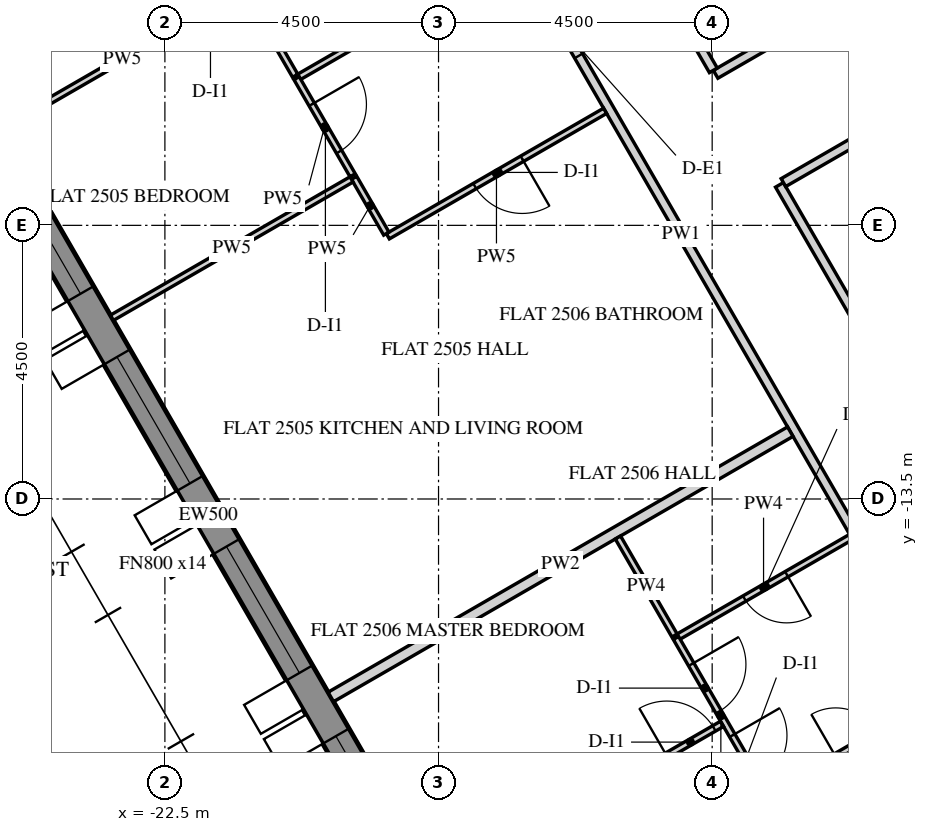
"""IFC4 building model, lengths in metres.
Left out: names, types, materials, properties, quantities, classifications, styles, units other than length and angle.
Written with IfcOpenShell. Run it as: python <this file> out.ifc"""

import sys

from ifc_helpers import new_model, si_unit, direction, frame, frame_2d, origin, place, context, subcontext, project, spatial, polyline, rectangle, outline, extrude, element, fill, save


model = new_model("IFC4")
c1 = context("Model", 3, precision=1e-05, world=origin(), true_north=direction((0.0, 1.0)))
c2 = subcontext(c1, "Body", "Model", "MODEL_VIEW")
j1 = project(units=[si_unit("LENGTHUNIT", "METRE"), si_unit("PLANEANGLEUNIT", "RADIAN")], contexts=[c1])
p1 = place(None, origin())
s1 = spatial("IfcSite", under=j1, at=p1, CompositionType="ELEMENT")
p2 = place(p1, origin())
s2 = spatial("IfcBuilding", under=s1, at=p2, CompositionType="ELEMENT")
p3 = place(p2, frame((0.0, 0.0, 314.7)))
s3 = spatial("IfcBuildingStorey", under=s2, at=p3, CompositionType="ELEMENT", Elevation=314.7)
p4 = place(p3, frame((-28.149, -2.745, -0.15), z_axis=(0.0, 0.0, 1.0), x_axis=(0.500003737743, -0.866023245787, 0.0)))
e1 = element("IfcWall", 1, at=p4, inside=s3, PredefinedType="SOLIDWALL", context=c2, shape_type="SweptSolid", body=[
    extrude(outline(polyline([(-0.021, -0.25), (25.468, -0.25), (25.421, 0.25), (0.021, 0.25), (-0.021, -0.25)])), origin(), (0.0, 0.0, 1.0), 3.9),
])
p5 = place(p4, frame((2.522, 0.0, 0.75)))
e2 = element("IfcOpeningElement", 2, at=p5, cuts=e1, PredefinedType="OPENING", context=c2, shape_type="SweptSolid", body=[
    extrude(rectangle(XDim=2.4, YDim=2.7, at=frame_2d((1.2, 1.35))), frame((0.0, 0.26, 0.0), z_axis=(0.0, -1.0, 0.0), x_axis=(1.0, 0.0, 0.0)), (0.0, 0.0, 1.0), 0.52),
])
p6 = place(p4, frame((6.122, 0.0, 0.75)))
e3 = element("IfcOpeningElement", 3, at=p6, cuts=e1, PredefinedType="OPENING", context=c2, shape_type="SweptSolid", body=[
    extrude(rectangle(XDim=2.4, YDim=2.7, at=frame_2d((1.2, 1.35))), frame((0.0, 0.26, 0.0), z_axis=(0.0, -1.0, 0.0), x_axis=(1.0, 0.0, 0.0)), (0.0, 0.0, 1.0), 0.52),
])
p7 = place(p4, frame((9.722, 0.0, 0.75)))
e4 = element("IfcOpeningElement", 4, at=p7, cuts=e1, PredefinedType="OPENING", context=c2, shape_type="SweptSolid", body=[
    extrude(rectangle(XDim=2.4, YDim=2.7, at=frame_2d((1.2, 1.35))), frame((0.0, 0.26, 0.0), z_axis=(0.0, -1.0, 0.0), x_axis=(1.0, 0.0, 0.0)), (0.0, 0.0, 1.0), 0.52),
])
p8 = place(p4, frame((13.323, 0.0, 0.75)))
e5 = element("IfcOpeningElement", 5, at=p8, cuts=e1, PredefinedType="OPENING", context=c2, shape_type="SweptSolid", body=[
    extrude(rectangle(XDim=2.4, YDim=2.7, at=frame_2d((1.2, 1.35))), frame((0.0, 0.26, 0.0), z_axis=(0.0, -1.0, 0.0), x_axis=(1.0, 0.0, 0.0)), (0.0, 0.0, 1.0), 0.52),
])
p9 = place(p4, frame((16.922, 0.0, 0.75)))
e6 = element("IfcOpeningElement", 6, at=p9, cuts=e1, PredefinedType="OPENING", context=c2, shape_type="SweptSolid", body=[
    extrude(rectangle(XDim=2.4, YDim=2.7, at=frame_2d((1.2, 1.35))), frame((0.0, 0.26, 0.0), z_axis=(0.0, -1.0, 0.0), x_axis=(1.0, 0.0, 0.0)), (0.0, 0.0, 1.0), 0.52),
])
p10 = place(p4, frame((20.522, 0.0, 0.75)))
e7 = element("IfcOpeningElement", 7, at=p10, cuts=e1, PredefinedType="OPENING", context=c2, shape_type="SweptSolid", body=[
    extrude(rectangle(XDim=2.4, YDim=2.7, at=frame_2d((1.2, 1.35))), frame((0.0, 0.26, 0.0), z_axis=(0.0, -1.0, 0.0), x_axis=(1.0, 0.0, 0.0)), (0.0, 0.0, 1.0), 0.52),
])
p11 = place(p3, frame((-12.471, 0.0, -0.15), z_axis=(0.0, 0.0, 1.0), x_axis=(0.499996419489, -0.866027470984, 0.0)))
e8 = element("IfcWall", 8, at=p11, inside=s3, PredefinedType="SHEAR", context=c2, shape_type="SweptSolid", body=[
    extrude(outline(polyline([(-0.115, -0.2), (12.586, -0.2), (12.355, 0.2), (0.115, 0.2), (-0.115, -0.2)])), origin(), (0.0, 0.0, 1.0), 3.9),
])
p12 = place(p11, frame((5.306, 0.0, 0.15)))
e9 = element("IfcOpeningElement", 9, at=p12, cuts=e8, PredefinedType="OPENING", context=c2, shape_type="SweptSolid", body=[
    extrude(rectangle(XDim=1.8, YDim=2.4, at=frame_2d((0.9, 1.2))), frame((0.0, 0.21, 0.0), z_axis=(0.0, -1.0, 0.0), x_axis=(1.0, 0.0, 0.0)), (0.0, 0.0, 1.0), 0.42),
])
p13 = place(p3, frame((-17.659, -2.814, 0.0), z_axis=(0.0, 0.0, 1.0), x_axis=(0.499992611149, -0.866029669697, 0.0)))
e10 = element("IfcWall", 10, at=p13, inside=s3, PredefinedType="PARTITIONING", context=c2, shape_type="SweptSolid", body=[
    extrude(rectangle(XDim=14.602, YDim=0.15, at=frame_2d((7.301, 0.0))), origin(), (0.0, 0.0, 1.0), 2.988),
])
p14 = place(p13, frame((2.925, 0.0, 0.0)))
e11 = element("IfcOpeningElement", 11, at=p14, cuts=e10, PredefinedType="OPENING", context=c2, shape_type="SweptSolid", body=[
    extrude(rectangle(XDim=1.0, YDim=2.1, at=frame_2d((0.5, 1.05))), frame((0.0, 0.085, 0.0), z_axis=(0.0, -1.0, 0.0), x_axis=(1.0, 0.0, 0.0)), (0.0, 0.0, 1.0), 0.17),
])
p15 = place(p13, frame((13.452, 0.0, 0.0)))
e12 = element("IfcOpeningElement", 12, at=p15, cuts=e10, PredefinedType="OPENING", context=c2, shape_type="SweptSolid", body=[
    extrude(rectangle(XDim=1.0, YDim=2.1, at=frame_2d((0.5, 1.05))), frame((0.0, 0.085, 0.0), z_axis=(0.0, -1.0, 0.0), x_axis=(1.0, 0.0, 0.0)), (0.0, 0.0, 1.0), 0.17),
])
p16 = place(p3, frame((-10.066, -4.566, 0.0), z_axis=(0.0, 0.0, 1.0), x_axis=(-0.866027128446, -0.499997012787, 0.0)))
e13 = element("IfcWall", 13, at=p16, inside=s3, PredefinedType="PARTITIONING", context=c2, shape_type="SweptSolid", body=[
    extrude(rectangle(XDim=3.9, YDim=0.15, at=frame_2d((1.95, 0.0))), origin(), (0.0, 0.0, 1.0), 2.988),
])
p17 = place(p3, frame((-13.481, -6.451, 0.0), z_axis=(0.0, 0.0, 1.0), x_axis=(-0.499990905326, 0.866030654533, 0.0)))
e14 = element("IfcWall", 14, at=p17, inside=s3, PredefinedType="PARTITIONING", context=c2, shape_type="SweptSolid", body=[
    extrude(rectangle(XDim=4.356, YDim=0.15, at=frame_2d((2.178, 0.0))), origin(), (0.0, 0.0, 1.0), 2.988),
])
p18 = place(p17, frame((1.728, 0.0, 0.0)))
e15 = element("IfcOpeningElement", 15, at=p18, cuts=e14, PredefinedType="OPENING", context=c2, shape_type="SweptSolid", body=[
    extrude(rectangle(XDim=0.9, YDim=2.1, at=frame_2d((0.45, 1.05))), frame((0.0, 0.085, 0.0), z_axis=(0.0, -1.0, 0.0), x_axis=(1.0, 0.0, 0.0)), (0.0, 0.0, 1.0), 0.17),
])
p19 = place(p3, frame((-9.403, -13.514, 0.0), z_axis=(0.0, 0.0, 1.0), x_axis=(-0.499998061752, 0.866026522829, 0.0)))
e16 = element("IfcWall", 16, at=p19, inside=s3, PredefinedType="PARTITIONING", context=c2, shape_type="SweptSolid", body=[
    extrude(rectangle(XDim=5.981, YDim=0.15, at=frame_2d((2.99, 0.0))), origin(), (0.0, 0.0, 1.0), 2.988),
])
p20 = place(p3, frame((-12.328, -8.297, 0.0), z_axis=(0.0, 0.0, 1.0), x_axis=(0.866027222339, 0.499996850159, 0.0)))
e17 = element("IfcWall", 17, at=p20, inside=s3, PredefinedType="PARTITIONING", context=c2, shape_type="SweptSolid", body=[
    extrude(rectangle(XDim=3.825, YDim=0.15, at=frame_2d((1.913, 0.0))), origin(), (0.0, 0.0, 1.0), 2.988),
])
p21 = place(p3, frame((-15.261, -7.117, 0.0), z_axis=(0.0, 0.0, 1.0), x_axis=(-0.866019999656, -0.500009360108, 0.0)))
e18 = element("IfcWall", 18, at=p21, inside=s3, PredefinedType="PARTITIONING", context=c2, shape_type="SweptSolid", body=[
    extrude(rectangle(XDim=4.125, YDim=0.1, at=frame_2d((2.062, 0.0))), origin(), (0.0, 0.0, 1.0), 2.988),
])
p22 = place(p21, frame((1.575, 0.0, 0.0)))
e19 = element("IfcOpeningElement", 19, at=p22, cuts=e18, PredefinedType="OPENING", context=c2, shape_type="SweptSolid", body=[
    extrude(rectangle(XDim=0.9, YDim=2.1, at=frame_2d((0.45, 1.05))), frame((0.0, 0.06, 0.0), z_axis=(0.0, -1.0, 0.0), x_axis=(1.0, 0.0, 0.0)), (0.0, 0.0, 1.0), 0.12),
])
p23 = place(p3, frame((-18.858, -9.136, 0.0), z_axis=(0.0, 0.0, 1.0), x_axis=(-0.499928435111, 0.86606671785, 0.0)))
e20 = element("IfcWall", 20, at=p23, inside=s3, PredefinedType="PARTITIONING", context=c2, shape_type="SweptSolid", body=[
    extrude(rectangle(XDim=1.06, YDim=0.1, at=frame_2d((0.53, 0.0))), origin(), (0.0, 0.0, 1.0), 2.988),
])
p24 = place(p3, frame((-19.431, -8.245, 0.0), z_axis=(0.0, 0.0, 1.0), x_axis=(-0.866035472144, -0.499982560684, 0.0)))
e21 = element("IfcWall", 21, at=p24, inside=s3, PredefinedType="PARTITIONING", context=c2, shape_type="SweptSolid", body=[
    extrude(rectangle(XDim=4.55, YDim=0.1, at=frame_2d((2.275, 0.0))), origin(), (0.0, 0.0, 1.0), 2.988),
])
p25 = place(p3, frame((-19.771, -16.755, 0.0), z_axis=(0.0, 0.0, 1.0), x_axis=(0.866025292695, 0.500000192413, 0.0)))
e22 = element("IfcWall", 22, at=p25, inside=s3, PredefinedType="PARTITIONING", context=c2, shape_type="SweptSolid", body=[
    extrude(rectangle(XDim=8.725, YDim=0.18, at=frame_2d((4.363, 0.0))), origin(), (0.0, 0.0, 1.0), 2.988),
])
p26 = place(p3, frame((-16.761, -4.519, 0.0), z_axis=(0.0, 0.0, 1.0), x_axis=(-0.866019999656, -0.500009360108, 0.0)))
e23 = element("IfcWall", 23, at=p26, inside=s3, PredefinedType="PARTITIONING", context=c2, shape_type="SweptSolid", body=[
    extrude(rectangle(XDim=4.125, YDim=0.1, at=frame_2d((2.062, 0.0))), origin(), (0.0, 0.0, 1.0), 2.988),
])
p27 = place(p26, frame((1.625, 0.0, 0.0)))
e24 = element("IfcOpeningElement", 24, at=p27, cuts=e23, PredefinedType="OPENING", context=c2, shape_type="SweptSolid", body=[
    extrude(rectangle(XDim=0.8, YDim=2.1, at=frame_2d((0.4, 1.05))), frame((0.0, 0.06, 0.0), z_axis=(0.0, -1.0, 0.0), x_axis=(1.0, 0.0, 0.0)), (0.0, 0.0, 1.0), 0.12),
])
p28 = place(p3, frame((-20.334, -6.58, 0.0), z_axis=(0.0, 0.0, 1.0), x_axis=(0.499955500775, -0.8660510939, 0.0)))
e25 = element("IfcWall", 25, at=p28, inside=s3, PredefinedType="PARTITIONING", context=c2, shape_type="SweptSolid", body=[
    extrude(rectangle(XDim=1.844, YDim=0.1, at=frame_2d((0.922, 0.0))), origin(), (0.0, 0.0, 1.0), 2.988),
])
p29 = place(p28, frame((0.498, 0.0, 0.0)))
e26 = element("IfcOpeningElement", 26, at=p29, cuts=e25, PredefinedType="OPENING", context=c2, shape_type="SweptSolid", body=[
    extrude(rectangle(XDim=0.9, YDim=2.1, at=frame_2d((0.45, 1.05))), frame((0.0, 0.06, 0.0), z_axis=(0.0, -1.0, 0.0), x_axis=(1.0, 0.0, 0.0)), (0.0, 0.0, 1.0), 0.12),
])
p30 = place(p3, frame((-21.188, -5.102, 0.0), z_axis=(0.0, 0.0, 1.0), x_axis=(0.499998264499, -0.866026405774, 0.0)))
e27 = element("IfcWall", 27, at=p30, inside=s3, PredefinedType="PARTITIONING", context=c2, shape_type="SweptSolid", body=[
    extrude(rectangle(XDim=1.66, YDim=0.1, at=frame_2d((0.83, 0.0))), origin(), (0.0, 0.0, 1.0), 2.988),
])
p31 = place(p3, frame((-25.171, -7.402, 0.0), z_axis=(0.0, 0.0, 1.0), x_axis=(0.866022057717, 0.500005795514, 0.0)))
e28 = element("IfcWall", 28, at=p31, inside=s3, PredefinedType="PARTITIONING", context=c2, shape_type="SweptSolid", body=[
    extrude(rectangle(XDim=4.55, YDim=0.1, at=frame_2d((2.275, 0.0))), origin(), (0.0, 0.0, 1.0), 2.988),
])
p32 = place(p31, frame((3.5, 0.0, 0.0)))
e29 = element("IfcOpeningElement", 29, at=p32, cuts=e28, PredefinedType="OPENING", context=c2, shape_type="SweptSolid", body=[
    extrude(rectangle(XDim=0.9, YDim=2.1, at=frame_2d((0.45, 1.05))), frame((0.0, 0.06, 0.0), z_axis=(0.0, -1.0, 0.0), x_axis=(1.0, 0.0, 0.0)), (0.0, 0.0, 1.0), 0.12),
])
p33 = place(p3, frame((-3.641, -15.525, 0.0), z_axis=(0.0, 0.0, 1.0), x_axis=(-0.866026229868, -0.499998569178, 0.0)))
e30 = element("IfcWall", 30, at=p33, inside=s3, PredefinedType="PARTITIONING", context=c2, shape_type="SweptSolid", body=[
    extrude(rectangle(XDim=9.185, YDim=0.1, at=frame_2d((4.592, 0.0))), origin(), (0.0, 0.0, 1.0), 2.988),
])
p34 = place(p3, frame((-11.215, -14.125, 0.0), z_axis=(0.0, 0.0, 1.0), x_axis=(-0.866020521143, -0.500008456887, 0.0)))
e31 = element("IfcWall", 31, at=p34, inside=s3, PredefinedType="PARTITIONING", context=c2, shape_type="SweptSolid", body=[
    extrude(rectangle(XDim=3.325, YDim=0.1, at=frame_2d((1.663, 0.0))), origin(), (0.0, 0.0, 1.0), 2.988),
])
p35 = place(p34, frame((1.225, 0.0, 0.0)))
e32 = element("IfcOpeningElement", 32, at=p35, cuts=e31, PredefinedType="OPENING", context=c2, shape_type="SweptSolid", body=[
    extrude(rectangle(XDim=0.8, YDim=2.1, at=frame_2d((0.4, 1.05))), frame((0.0, 0.06, 0.0), z_axis=(0.0, -1.0, 0.0), x_axis=(1.0, 0.0, 0.0)), (0.0, 0.0, 1.0), 0.12),
])
p36 = place(p3, frame((-14.096, -15.785, 0.0), z_axis=(0.0, 0.0, 1.0), x_axis=(0.49999668571, -0.866027317282, 0.0)))
e33 = element("IfcWall", 33, at=p36, inside=s3, PredefinedType="PARTITIONING", context=c2, shape_type="SweptSolid", body=[
    extrude(rectangle(XDim=2.954, YDim=0.1, at=frame_2d((1.477, 0.0))), origin(), (0.0, 0.0, 1.0), 2.988),
])
p37 = place(p36, frame((0.502, 0.0, 0.0)))
e34 = element("IfcOpeningElement", 34, at=p37, cuts=e33, PredefinedType="OPENING", context=c2, shape_type="SweptSolid", body=[
    extrude(rectangle(XDim=0.9, YDim=2.1, at=frame_2d((0.45, 1.05))), frame((0.0, 0.06, 0.0), z_axis=(0.0, -1.0, 0.0), x_axis=(1.0, 0.0, 0.0)), (0.0, 0.0, 1.0), 0.12),
])
p38 = place(p36, frame((1.852, 0.0, 0.0)))
e35 = element("IfcOpeningElement", 35, at=p38, cuts=e33, PredefinedType="OPENING", context=c2, shape_type="SweptSolid", body=[
    extrude(rectangle(XDim=0.9, YDim=2.1, at=frame_2d((0.45, 1.05))), frame((0.0, 0.06, 0.0), z_axis=(0.0, -1.0, 0.0), x_axis=(1.0, 0.0, 0.0)), (0.0, 0.0, 1.0), 0.12),
])
p39 = place(p3, frame((-12.595, -18.385, 0.0), z_axis=(0.0, 0.0, 1.0), x_axis=(0.866031041839, 0.499990234476, 0.0)))
e36 = element("IfcWall", 36, at=p39, inside=s3, PredefinedType="PARTITIONING", context=c2, shape_type="SweptSolid", body=[
    extrude(rectangle(XDim=6.129, YDim=0.1, at=frame_2d((3.065, 0.0))), origin(), (0.0, 0.0, 1.0), 2.988),
])
p40 = place(p39, frame((1.3, 0.0, 0.0)))
e37 = element("IfcOpeningElement", 37, at=p40, cuts=e36, PredefinedType="OPENING", context=c2, shape_type="SweptSolid", body=[
    extrude(rectangle(XDim=0.8, YDim=2.1, at=frame_2d((0.4, 1.05))), frame((0.0, 0.06, 0.0), z_axis=(0.0, -1.0, 0.0), x_axis=(1.0, 0.0, 0.0)), (0.0, 0.0, 1.0), 0.12),
])
p41 = place(p3, frame((-15.05, -14.133, 0.0), z_axis=(0.0, 0.0, 1.0), x_axis=(0.500059143742, -0.865991254436, 0.0)))
e38 = element("IfcWall", 38, at=p41, inside=s3, PredefinedType="PARTITIONING", context=c2, shape_type="SweptSolid", body=[
    extrude(rectangle(XDim=1.862, YDim=0.1, at=frame_2d((0.931, 0.0))), origin(), (0.0, 0.0, 1.0), 2.988),
])
p42 = place(p3, frame((-17.971, -19.873, 0.0), z_axis=(0.0, 0.0, 1.0), x_axis=(0.866032834954, 0.499987128616, 0.0)))
e39 = element("IfcWall", 39, at=p42, inside=s3, PredefinedType="PARTITIONING", context=c2, shape_type="SweptSolid", body=[
    extrude(rectangle(XDim=5.35, YDim=0.1, at=frame_2d((2.675, 0.0))), origin(), (0.0, 0.0, 1.0), 2.988),
])
p43 = place(p42, frame((4.3, 0.0, 0.0)))
e40 = element("IfcOpeningElement", 40, at=p43, cuts=e39, PredefinedType="OPENING", context=c2, shape_type="SweptSolid", body=[
    extrude(rectangle(XDim=0.9, YDim=2.1, at=frame_2d((0.45, 1.05))), frame((0.0, 0.06, 0.0), z_axis=(0.0, -1.0, 0.0), x_axis=(1.0, 0.0, 0.0)), (0.0, 0.0, 1.0), 0.12),
])
p44 = place(p6, frame((0.0, 0.18, 0.0)))
e41 = element("IfcWindow", 41, at=p44, inside=s3, PartitioningType="DOUBLE_PANEL_VERTICAL", PredefinedType="WINDOW", context=c2, shape_type="SweptSolid", body=[
    extrude(rectangle(XDim=2.4, YDim=2.7, at=frame_2d((1.2, 1.35))), frame((0.0, 0.03, 0.0), z_axis=(0.0, -1.0, 0.0), x_axis=(1.0, 0.0, 0.0)), (0.0, 0.0, 1.0), 0.06),
])
fill(e3, e41)
p45 = place(p7, frame((0.0, 0.18, 0.0)))
e42 = element("IfcWindow", 42, at=p45, inside=s3, PartitioningType="DOUBLE_PANEL_VERTICAL", PredefinedType="WINDOW", context=c2, shape_type="SweptSolid", body=[
    extrude(rectangle(XDim=2.4, YDim=2.7, at=frame_2d((1.2, 1.35))), frame((0.0, 0.03, 0.0), z_axis=(0.0, -1.0, 0.0), x_axis=(1.0, 0.0, 0.0)), (0.0, 0.0, 1.0), 0.06),
])
fill(e4, e42)
p46 = place(p8, frame((0.0, 0.18, 0.0)))
e43 = element("IfcWindow", 43, at=p46, inside=s3, PartitioningType="DOUBLE_PANEL_VERTICAL", PredefinedType="WINDOW", context=c2, shape_type="SweptSolid", body=[
    extrude(rectangle(XDim=2.4, YDim=2.7, at=frame_2d((1.2, 1.35))), frame((0.0, 0.03, 0.0), z_axis=(0.0, -1.0, 0.0), x_axis=(1.0, 0.0, 0.0)), (0.0, 0.0, 1.0), 0.06),
])
fill(e5, e43)
p47 = place(p9, frame((0.0, 0.18, 0.0)))
e44 = element("IfcWindow", 44, at=p47, inside=s3, PartitioningType="DOUBLE_PANEL_VERTICAL", PredefinedType="WINDOW", context=c2, shape_type="SweptSolid", body=[
    extrude(rectangle(XDim=2.4, YDim=2.7, at=frame_2d((1.2, 1.35))), frame((0.0, 0.03, 0.0), z_axis=(0.0, -1.0, 0.0), x_axis=(1.0, 0.0, 0.0)), (0.0, 0.0, 1.0), 0.06),
])
fill(e6, e44)
p48 = place(p14, origin())
e45 = element("IfcDoor", 45, at=p48, inside=s3, OperationType="SINGLE_SWING_RIGHT", PredefinedType="DOOR", context=c2, shape_type="SweptSolid", body=[
    extrude(rectangle(XDim=1.0, YDim=2.1, at=frame_2d((0.5, 1.05))), frame((0.0, 0.025, 0.0), z_axis=(0.0, -1.0, 0.0), x_axis=(1.0, 0.0, 0.0)), (0.0, 0.0, 1.0), 0.05),
])
fill(e11, e45)
p49 = place(p22, origin())
e46 = element("IfcDoor", 46, at=p49, inside=s3, OperationType="SINGLE_SWING_RIGHT", PredefinedType="DOOR", context=c2, shape_type="SweptSolid", body=[
    extrude(rectangle(XDim=0.9, YDim=2.1, at=frame_2d((0.45, 1.05))), frame((0.0, 0.025, 0.0), z_axis=(0.0, -1.0, 0.0), x_axis=(1.0, 0.0, 0.0)), (0.0, 0.0, 1.0), 0.05),
])
fill(e19, e46)
p50 = place(p29, origin())
e47 = element("IfcDoor", 47, at=p50, inside=s3, OperationType="SINGLE_SWING_LEFT", PredefinedType="DOOR", context=c2, shape_type="SweptSolid", body=[
    extrude(rectangle(XDim=0.9, YDim=2.1, at=frame_2d((0.45, 1.05))), frame((0.0, 0.025, 0.0), z_axis=(0.0, -1.0, 0.0), x_axis=(1.0, 0.0, 0.0)), (0.0, 0.0, 1.0), 0.05),
])
fill(e26, e47)
p51 = place(p35, origin())
e48 = element("IfcDoor", 48, at=p51, inside=s3, OperationType="SINGLE_SWING_RIGHT", PredefinedType="DOOR", context=c2, shape_type="SweptSolid", body=[
    extrude(rectangle(XDim=0.8, YDim=2.1, at=frame_2d((0.4, 1.05))), frame((0.0, 0.025, 0.0), z_axis=(0.0, -1.0, 0.0), x_axis=(1.0, 0.0, 0.0)), (0.0, 0.0, 1.0), 0.05),
])
fill(e32, e48)
p52 = place(p37, origin())
e49 = element("IfcDoor", 49, at=p52, inside=s3, OperationType="SINGLE_SWING_LEFT", PredefinedType="DOOR", context=c2, shape_type="SweptSolid", body=[
    extrude(rectangle(XDim=0.9, YDim=2.1, at=frame_2d((0.45, 1.05))), frame((0.0, 0.025, 0.0), z_axis=(0.0, -1.0, 0.0), x_axis=(1.0, 0.0, 0.0)), (0.0, 0.0, 1.0), 0.05),
])
fill(e34, e49)
p53 = place(p43, origin())
e50 = element("IfcDoor", 50, at=p53, inside=s3, OperationType="SINGLE_SWING_RIGHT", PredefinedType="DOOR", context=c2, shape_type="SweptSolid", body=[
    extrude(rectangle(XDim=0.9, YDim=2.1, at=frame_2d((0.45, 1.05))), frame((0.0, 0.025, 0.0), z_axis=(0.0, -1.0, 0.0), x_axis=(1.0, 0.0, 0.0)), (0.0, 0.0, 1.0), 0.05),
])
fill(e40, e50)
p54 = place(p38, origin())
e51 = element("IfcDoor", 51, at=p54, inside=s3, OperationType="SINGLE_SWING_RIGHT", PredefinedType="DOOR", context=c2, shape_type="SweptSolid", body=[
    extrude(rectangle(XDim=0.9, YDim=2.1, at=frame_2d((0.45, 1.05))), frame((0.0, 0.025, 0.0), z_axis=(0.0, -1.0, 0.0), x_axis=(1.0, 0.0, 0.0)), (0.0, 0.0, 1.0), 0.05),
])
fill(e35, e51)
p55 = place(p40, origin())
e52 = element("IfcDoor", 52, at=p55, inside=s3, OperationType="SINGLE_SWING_RIGHT", PredefinedType="DOOR", context=c2, shape_type="SweptSolid", body=[
    extrude(rectangle(XDim=0.8, YDim=2.1, at=frame_2d((0.4, 1.05))), frame((0.0, 0.025, 0.0), z_axis=(0.0, -1.0, 0.0), x_axis=(1.0, 0.0, 0.0)), (0.0, 0.0, 1.0), 0.05),
])
fill(e37, e52)
save(model, sys.argv[1])
